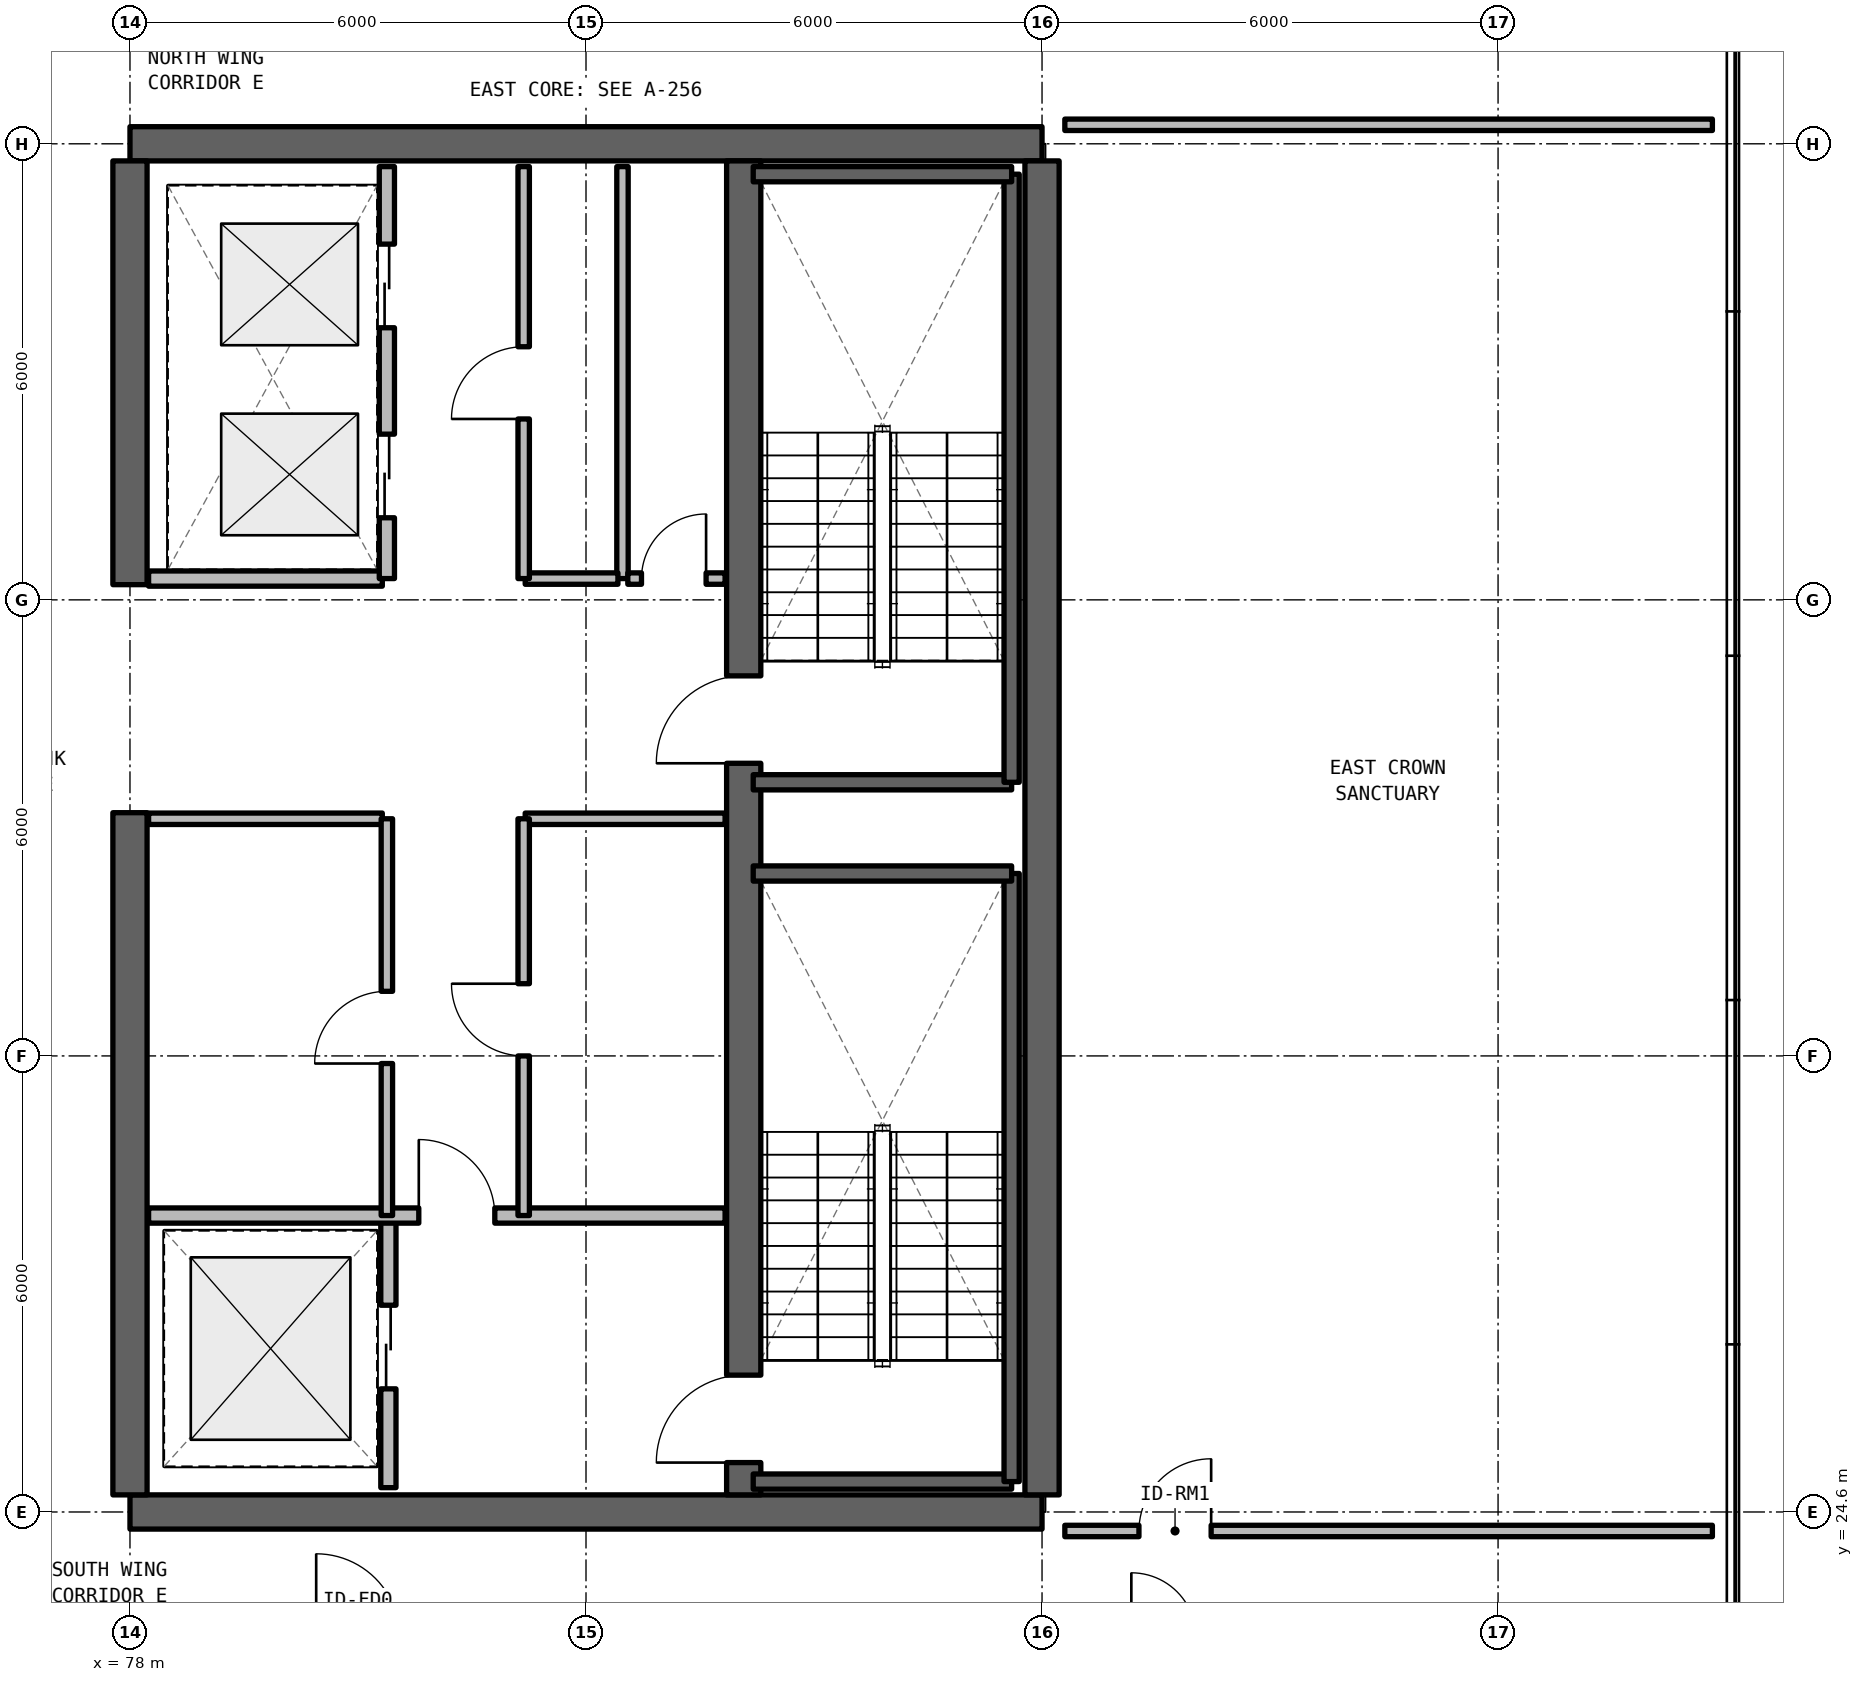
"""IFC4 building model, lengths in metres.
Left out: names, types, materials, properties, quantities, classifications, styles, units other than length and angle.
Written with IfcOpenShell. Run it as: python <this file> out.ifc"""

import sys

from ifc_helpers import new_model, si_unit, direction, frame, frame_2d, origin, place, context, subcontext, project, spatial, rectangle, extrude, element, fill, save


model = new_model("IFC4")
c1 = context("Model", 3, precision=1e-05, world=origin(), true_north=direction((0.0, 1.0)))
c2 = subcontext(c1, "Body", "Model", "MODEL_VIEW")
j1 = project(units=[si_unit("LENGTHUNIT", "METRE"), si_unit("PLANEANGLEUNIT", "RADIAN")], contexts=[c1])
p1 = place(None, origin())
s1 = spatial("IfcSite", under=j1, at=p1, CompositionType="ELEMENT")
p2 = place(p1, origin())
s2 = spatial("IfcBuilding", under=s1, at=p2, CompositionType="ELEMENT")
p3 = place(p2, frame((0.0, 0.0, 264.33)))
s3 = spatial("IfcBuildingStorey", under=s2, at=p3, CompositionType="ELEMENT", Elevation=264.33)
for number, where, z_axis, x_axis in (
    (1, (78.0, 24.6, 0.0), (0.0, 0.0, 1.0), (1.0, 0.0, 0.0)),
    (2, (90.0, 42.6, 0.0), (0.0, 0.0, 1.0), (-1.0, 0.0, 0.0)),
):
    element("IfcWall", number, at=place(p3, frame(where, z_axis=z_axis, x_axis=x_axis)), inside=s3, PredefinedType="SHEAR", context=c2, shape_type="SweptSolid", body=[
        extrude(rectangle(XDim=12.0, YDim=0.45, at=frame_2d((6.0, 0.0))), origin(), (0.0, 0.0, 1.0), 3.63),
    ])
p4 = place(p3, frame((90.0, 24.825, 0.0), z_axis=(0.0, 0.0, 1.0), x_axis=(0.0, 1.0, 0.0)))
e3 = element("IfcWall", 3, at=p4, inside=s3, PredefinedType="SHEAR", context=c2, shape_type="SweptSolid", body=[
    extrude(rectangle(XDim=17.55, YDim=0.45, at=frame_2d((8.775, 0.0))), origin(), (0.0, 0.0, 1.0), 3.63),
])
p5 = place(p3, frame((78.0, 24.825, 0.0), z_axis=(0.0, 0.0, 1.0), x_axis=(0.0, 1.0, 0.0)))
e4 = element("IfcWall", 4, at=p5, inside=s3, PredefinedType="SHEAR", context=c2, shape_type="SweptSolid", body=[
    extrude(rectangle(XDim=8.975, YDim=0.45, at=frame_2d((4.488, 0.0))), origin(), (0.0, 0.0, 1.0), 3.63),
])
p6 = place(p3, frame((78.0, 36.8, 0.0), z_axis=(0.0, 0.0, 1.0), x_axis=(0.0, 1.0, 0.0)))
e5 = element("IfcWall", 5, at=p6, inside=s3, PredefinedType="SHEAR", context=c2, shape_type="SweptSolid", body=[
    extrude(rectangle(XDim=5.575, YDim=0.45, at=frame_2d((2.788, 0.0))), origin(), (0.0, 0.0, 1.0), 3.63),
])
p7 = place(p3, frame((86.075, 24.825, 0.0), z_axis=(0.0, 0.0, 1.0), x_axis=(0.0, 1.0, 0.0)))
e6 = element("IfcWall", 6, at=p7, inside=s3, PredefinedType="SHEAR", context=c2, shape_type="SweptSolid", body=[
    extrude(rectangle(XDim=17.55, YDim=0.45, at=frame_2d((8.775, 0.0))), origin(), (0.0, 0.0, 1.0), 3.63),
])
p8 = place(p7, frame((0.425, 0.0, 0.0)))
e7 = element("IfcOpeningElement", 7, at=p8, cuts=e6, PredefinedType="OPENING", context=c2, shape_type="SweptSolid", body=[
    extrude(rectangle(XDim=1.15, YDim=2.15, at=frame_2d((0.575, 1.075))), frame((0.0, 0.235, 0.0), z_axis=(0.0, -1.0, 0.0), x_axis=(1.0, 0.0, 0.0)), (0.0, 0.0, 1.0), 0.47),
])
p9 = place(p7, frame((9.625, 0.0, 0.0)))
e8 = element("IfcOpeningElement", 8, at=p9, cuts=e6, PredefinedType="OPENING", context=c2, shape_type="SweptSolid", body=[
    extrude(rectangle(XDim=1.15, YDim=2.15, at=frame_2d((0.575, 1.075))), frame((0.0, 0.235, 0.0), z_axis=(0.0, -1.0, 0.0), x_axis=(1.0, 0.0, 0.0)), (0.0, 0.0, 1.0), 0.47),
])
p10 = place(p3, frame((81.4, 24.92, 0.0), z_axis=(0.0, 0.0, 1.0), x_axis=(0.0, 1.0, 0.0)))
e9 = element("IfcWall", 9, at=p10, inside=s3, PredefinedType="SOLIDWALL", context=c2, shape_type="SweptSolid", body=[
    extrude(rectangle(XDim=3.58, YDim=0.2, at=frame_2d((1.79, 0.0))), origin(), (0.0, 0.0, 1.0), 2.63),
])
p11 = place(p10, frame((1.3, 0.0, 0.0)))
e10 = element("IfcOpeningElement", 10, at=p11, cuts=e9, PredefinedType="OPENING", context=c2, shape_type="SweptSolid", body=[
    extrude(rectangle(XDim=1.1, YDim=2.2, at=frame_2d((0.55, 1.1))), frame((0.0, 0.11, 0.0), z_axis=(0.0, -1.0, 0.0), x_axis=(1.0, 0.0, 0.0)), (0.0, 0.0, 1.0), 0.22),
])
p12 = place(p3, frame((78.245, 28.5, 0.0), z_axis=(0.0, 0.0, 1.0), x_axis=(1.0, 0.0, 0.0)))
e11 = element("IfcWall", 11, at=p12, inside=s3, PredefinedType="SOLIDWALL", context=c2, shape_type="SweptSolid", body=[
    extrude(rectangle(XDim=7.585, YDim=0.2, at=frame_2d((3.792, 0.0))), origin(), (0.0, 0.0, 1.0), 2.63),
])
p13 = place(p12, frame((3.555, 0.0, 0.0)))
e12 = element("IfcOpeningElement", 12, at=p13, cuts=e11, PredefinedType="OPENING", context=c2, shape_type="SweptSolid", body=[
    extrude(rectangle(XDim=1.0, YDim=2.15, at=frame_2d((0.5, 1.075))), frame((0.0, 0.11, 0.0), z_axis=(0.0, -1.0, 0.0), x_axis=(1.0, 0.0, 0.0)), (0.0, 0.0, 1.0), 0.22),
])
p14 = place(p3, frame((83.2, 33.72, 0.0), z_axis=(0.0, 0.0, 1.0), x_axis=(1.0, 0.0, 0.0)))
e13 = element("IfcWall", 13, at=p14, inside=s3, PredefinedType="SOLIDWALL", context=c2, shape_type="SweptSolid", body=[
    extrude(rectangle(XDim=2.63, YDim=0.15, at=frame_2d((1.315, 0.0))), origin(), (0.0, 0.0, 1.0), 2.63),
])
p15 = place(p3, frame((83.18, 28.5, 0.0), z_axis=(0.0, 0.0, 1.0), x_axis=(0.0, 1.0, 0.0)))
e14 = element("IfcWall", 14, at=p15, inside=s3, PredefinedType="SOLIDWALL", context=c2, shape_type="SweptSolid", body=[
    extrude(rectangle(XDim=5.22, YDim=0.15, at=frame_2d((2.61, 0.0))), origin(), (0.0, 0.0, 1.0), 2.63),
])
p16 = place(p15, frame((2.1, 0.0, 0.0)))
e15 = element("IfcOpeningElement", 15, at=p16, cuts=e14, PredefinedType="OPENING", context=c2, shape_type="SweptSolid", body=[
    extrude(rectangle(XDim=0.95, YDim=2.15, at=frame_2d((0.475, 1.075))), frame((0.0, 0.085, 0.0), z_axis=(0.0, -1.0, 0.0), x_axis=(1.0, 0.0, 0.0)), (0.0, 0.0, 1.0), 0.17),
])
p17 = place(p3, frame((78.245, 33.72, 0.0), z_axis=(0.0, 0.0, 1.0), x_axis=(1.0, 0.0, 0.0)))
e16 = element("IfcWall", 16, at=p17, inside=s3, PredefinedType="SOLIDWALL", context=c2, shape_type="SweptSolid", body=[
    extrude(rectangle(XDim=3.075, YDim=0.15, at=frame_2d((1.538, 0.0))), origin(), (0.0, 0.0, 1.0), 2.63),
])
p18 = place(p3, frame((81.38, 28.5, 0.0), z_axis=(0.0, 0.0, 1.0), x_axis=(0.0, 1.0, 0.0)))
e17 = element("IfcWall", 17, at=p18, inside=s3, PredefinedType="SOLIDWALL", context=c2, shape_type="SweptSolid", body=[
    extrude(rectangle(XDim=5.22, YDim=0.15, at=frame_2d((2.61, 0.0))), origin(), (0.0, 0.0, 1.0), 2.63),
])
p19 = place(p18, frame((2.0, 0.0, 0.0)))
e18 = element("IfcOpeningElement", 18, at=p19, cuts=e17, PredefinedType="OPENING", context=c2, shape_type="SweptSolid", body=[
    extrude(rectangle(XDim=0.95, YDim=2.15, at=frame_2d((0.475, 1.075))), frame((0.0, 0.085, 0.0), z_axis=(0.0, -1.0, 0.0), x_axis=(1.0, 0.0, 0.0)), (0.0, 0.0, 1.0), 0.17),
])
p20 = place(p3, frame((84.48, 36.88, 0.0), z_axis=(0.0, 0.0, 1.0), x_axis=(0.0, 1.0, 0.0)))
e19 = element("IfcWall", 19, at=p20, inside=s3, PredefinedType="SOLIDWALL", context=c2, shape_type="SweptSolid", body=[
    extrude(rectangle(XDim=5.42, YDim=0.15, at=frame_2d((2.71, 0.0))), origin(), (0.0, 0.0, 1.0), 2.63),
])
p21 = place(p3, frame((84.55, 36.88, 0.0), z_axis=(0.0, 0.0, 1.0), x_axis=(1.0, 0.0, 0.0)))
e20 = element("IfcWall", 20, at=p21, inside=s3, PredefinedType="SOLIDWALL", context=c2, shape_type="SweptSolid", body=[
    extrude(rectangle(XDim=1.28, YDim=0.15, at=frame_2d((0.64, 0.0))), origin(), (0.0, 0.0, 1.0), 2.63),
])
p22 = place(p21, frame((0.18, 0.0, 0.0)))
e21 = element("IfcOpeningElement", 21, at=p22, cuts=e20, PredefinedType="OPENING", context=c2, shape_type="SweptSolid", body=[
    extrude(rectangle(XDim=0.85, YDim=2.1, at=frame_2d((0.425, 1.05))), frame((0.0, 0.085, 0.0), z_axis=(0.0, -1.0, 0.0), x_axis=(1.0, 0.0, 0.0)), (0.0, 0.0, 1.0), 0.17),
])
p23 = place(p3, frame((83.2, 36.88, 0.0), z_axis=(0.0, 0.0, 1.0), x_axis=(1.0, 0.0, 0.0)))
e22 = element("IfcWall", 22, at=p23, inside=s3, PredefinedType="SOLIDWALL", context=c2, shape_type="SweptSolid", body=[
    extrude(rectangle(XDim=1.22, YDim=0.15, at=frame_2d((0.61, 0.0))), origin(), (0.0, 0.0, 1.0), 2.63),
])
p24 = place(p3, frame((83.18, 36.88, 0.0), z_axis=(0.0, 0.0, 1.0), x_axis=(0.0, 1.0, 0.0)))
e23 = element("IfcWall", 23, at=p24, inside=s3, PredefinedType="SOLIDWALL", context=c2, shape_type="SweptSolid", body=[
    extrude(rectangle(XDim=5.42, YDim=0.15, at=frame_2d((2.71, 0.0))), origin(), (0.0, 0.0, 1.0), 2.63),
])
p25 = place(p24, frame((2.1, 0.0, 0.0)))
e24 = element("IfcOpeningElement", 24, at=p25, cuts=e23, PredefinedType="OPENING", context=c2, shape_type="SweptSolid", body=[
    extrude(rectangle(XDim=0.95, YDim=2.15, at=frame_2d((0.475, 1.075))), frame((0.0, 0.085, 0.0), z_axis=(0.0, -1.0, 0.0), x_axis=(1.0, 0.0, 0.0)), (0.0, 0.0, 1.0), 0.17),
])
p26 = place(p3, frame((78.245, 36.88, 0.0), z_axis=(0.0, 0.0, 1.0), x_axis=(1.0, 0.0, 0.0)))
e25 = element("IfcWall", 25, at=p26, inside=s3, PredefinedType="SOLIDWALL", context=c2, shape_type="SweptSolid", body=[
    extrude(rectangle(XDim=3.075, YDim=0.2, at=frame_2d((1.538, 0.0))), origin(), (0.0, 0.0, 1.0), 2.63),
])
p27 = place(p3, frame((81.38, 36.88, 0.0), z_axis=(0.0, 0.0, 1.0), x_axis=(0.0, 1.0, 0.0)))
e26 = element("IfcWall", 26, at=p27, inside=s3, PredefinedType="SOLIDWALL", context=c2, shape_type="SweptSolid", body=[
    extrude(rectangle(XDim=5.42, YDim=0.2, at=frame_2d((2.71, 0.0))), origin(), (0.0, 0.0, 1.0), 2.63),
])
p28 = place(p27, frame((0.8, 0.0, 0.0)))
e27 = element("IfcOpeningElement", 27, at=p28, cuts=e26, PredefinedType="OPENING", context=c2, shape_type="SweptSolid", body=[
    extrude(rectangle(XDim=1.1, YDim=2.2, at=frame_2d((0.55, 1.1))), frame((0.0, 0.11, 0.0), z_axis=(0.0, -1.0, 0.0), x_axis=(1.0, 0.0, 0.0)), (0.0, 0.0, 1.0), 0.22),
])
p29 = place(p27, frame((3.3, 0.0, 0.0)))
e28 = element("IfcOpeningElement", 28, at=p29, cuts=e26, PredefinedType="OPENING", context=c2, shape_type="SweptSolid", body=[
    extrude(rectangle(XDim=1.1, YDim=2.2, at=frame_2d((0.55, 1.1))), frame((0.0, 0.11, 0.0), z_axis=(0.0, -1.0, 0.0), x_axis=(1.0, 0.0, 0.0)), (0.0, 0.0, 1.0), 0.22),
])
p30 = place(p3, frame((90.3, 24.35, 0.0), z_axis=(0.0, 0.0, 1.0), x_axis=(1.0, 0.0, 0.0)))
e29 = element("IfcWall", 29, at=p30, inside=s3, PredefinedType="SOLIDWALL", context=c2, shape_type="SweptSolid", body=[
    extrude(rectangle(XDim=8.52, YDim=0.15, at=frame_2d((4.26, 0.0))), origin(), (0.0, 0.0, 1.0), 2.63),
])
p31 = place(p30, frame((0.975, 0.0, 0.0)))
e30 = element("IfcOpeningElement", 30, at=p31, cuts=e29, PredefinedType="OPENING", context=c2, shape_type="SweptSolid", body=[
    extrude(rectangle(XDim=0.95, YDim=2.15, at=frame_2d((0.475, 1.075))), frame((0.0, 0.085, 0.0), z_axis=(0.0, -1.0, 0.0), x_axis=(1.0, 0.0, 0.0)), (0.0, 0.0, 1.0), 0.17),
])
p32 = place(p3, frame((90.3, 42.85, 0.0), z_axis=(0.0, 0.0, 1.0), x_axis=(1.0, 0.0, 0.0)))
e31 = element("IfcWall", 31, at=p32, inside=s3, PredefinedType="SOLIDWALL", context=c2, shape_type="SweptSolid", body=[
    extrude(rectangle(XDim=8.52, YDim=0.15, at=frame_2d((4.26, 0.0))), origin(), (0.0, 0.0, 1.0), 2.63),
])
p33 = place(p3, frame((86.2, 25.0, 0.0), z_axis=(0.0, 0.0, 1.0), x_axis=(1.0, 0.0, 0.0)))
e32 = element("IfcWall", 32, at=p33, inside=s3, PredefinedType="SOLIDWALL", context=c2, shape_type="SweptSolid", body=[
    extrude(rectangle(XDim=3.4, YDim=0.2, at=frame_2d((1.7, 0.0))), origin(), (0.0, 0.0, 1.0), 3.63),
])
p34 = place(p3, frame((89.6, 25.0, 0.0), z_axis=(0.0, 0.0, 1.0), x_axis=(0.0, 1.0, 0.0)))
e33 = element("IfcWall", 33, at=p34, inside=s3, PredefinedType="SOLIDWALL", context=c2, shape_type="SweptSolid", body=[
    extrude(rectangle(XDim=8.0, YDim=0.2, at=frame_2d((4.0, 0.0))), origin(), (0.0, 0.0, 1.0), 3.63),
])
for number, where, z_axis, x_axis in (
    (34, (89.6, 33.0, 0.0), (0.0, 0.0, 1.0), (-1.0, 0.0, 0.0)),
    (35, (86.2, 34.2, 0.0), (0.0, 0.0, 1.0), (1.0, 0.0, 0.0)),
):
    element("IfcWall", number, at=place(p3, frame(where, z_axis=z_axis, x_axis=x_axis)), inside=s3, PredefinedType="SOLIDWALL", context=c2, shape_type="SweptSolid", body=[
        extrude(rectangle(XDim=3.4, YDim=0.2, at=frame_2d((1.7, 0.0))), origin(), (0.0, 0.0, 1.0), 3.63),
    ])
p35 = place(p3, frame((89.6, 34.2, 0.0), z_axis=(0.0, 0.0, 1.0), x_axis=(0.0, 1.0, 0.0)))
e36 = element("IfcWall", 36, at=p35, inside=s3, PredefinedType="SOLIDWALL", context=c2, shape_type="SweptSolid", body=[
    extrude(rectangle(XDim=8.0, YDim=0.2, at=frame_2d((4.0, 0.0))), origin(), (0.0, 0.0, 1.0), 3.63),
])
p36 = place(p3, frame((89.6, 42.2, 0.0), z_axis=(0.0, 0.0, 1.0), x_axis=(-1.0, 0.0, 0.0)))
e37 = element("IfcWall", 37, at=p36, inside=s3, PredefinedType="SOLIDWALL", context=c2, shape_type="SweptSolid", body=[
    extrude(rectangle(XDim=3.4, YDim=0.2, at=frame_2d((1.7, 0.0))), origin(), (0.0, 0.0, 1.0), 3.63),
])
p37 = place(p11, origin())
e38 = element("IfcDoor", 38, at=p37, inside=s3, OperationType="SLIDING_TO_LEFT", PredefinedType="DOOR", context=c2, shape_type="SweptSolid", body=[
    extrude(rectangle(XDim=1.1, YDim=2.2, at=frame_2d((0.55, 1.1))), frame((0.0, 0.025, 0.0), z_axis=(0.0, -1.0, 0.0), x_axis=(1.0, 0.0, 0.0)), (0.0, 0.0, 1.0), 0.05),
])
fill(e10, e38)
p38 = place(p13, origin())
e39 = element("IfcDoor", 39, at=p38, inside=s3, OperationType="SINGLE_SWING_LEFT", PredefinedType="DOOR", context=c2, shape_type="SweptSolid", body=[
    extrude(rectangle(XDim=1.0, YDim=2.15, at=frame_2d((0.5, 1.075))), frame((0.0, 0.025, 0.0), z_axis=(0.0, -1.0, 0.0), x_axis=(1.0, 0.0, 0.0)), (0.0, 0.0, 1.0), 0.05),
])
fill(e12, e39)
p39 = place(p16, origin())
e40 = element("IfcDoor", 40, at=p39, inside=s3, OperationType="SINGLE_SWING_RIGHT", PredefinedType="DOOR", context=c2, shape_type="SweptSolid", body=[
    extrude(rectangle(XDim=0.95, YDim=2.15, at=frame_2d((0.475, 1.075))), frame((0.0, 0.025, 0.0), z_axis=(0.0, -1.0, 0.0), x_axis=(1.0, 0.0, 0.0)), (0.0, 0.0, 1.0), 0.05),
])
fill(e15, e40)
p40 = place(p19, origin())
e41 = element("IfcDoor", 41, at=p40, inside=s3, OperationType="SINGLE_SWING_LEFT", PredefinedType="DOOR", context=c2, shape_type="SweptSolid", body=[
    extrude(rectangle(XDim=0.95, YDim=2.15, at=frame_2d((0.475, 1.075))), frame((0.0, 0.025, 0.0), z_axis=(0.0, -1.0, 0.0), x_axis=(1.0, 0.0, 0.0)), (0.0, 0.0, 1.0), 0.05),
])
fill(e18, e41)
p41 = place(p22, origin())
e42 = element("IfcDoor", 42, at=p41, inside=s3, OperationType="SINGLE_SWING_RIGHT", PredefinedType="DOOR", context=c2, shape_type="SweptSolid", body=[
    extrude(rectangle(XDim=0.85, YDim=2.1, at=frame_2d((0.425, 1.05))), frame((0.0, 0.025, 0.0), z_axis=(0.0, -1.0, 0.0), x_axis=(1.0, 0.0, 0.0)), (0.0, 0.0, 1.0), 0.05),
])
fill(e21, e42)
p42 = place(p25, origin())
e43 = element("IfcDoor", 43, at=p42, inside=s3, OperationType="SINGLE_SWING_LEFT", PredefinedType="DOOR", context=c2, shape_type="SweptSolid", body=[
    extrude(rectangle(XDim=0.95, YDim=2.15, at=frame_2d((0.475, 1.075))), frame((0.0, 0.025, 0.0), z_axis=(0.0, -1.0, 0.0), x_axis=(1.0, 0.0, 0.0)), (0.0, 0.0, 1.0), 0.05),
])
fill(e24, e43)
p43 = place(p28, origin())
e44 = element("IfcDoor", 44, at=p43, inside=s3, OperationType="SLIDING_TO_LEFT", PredefinedType="DOOR", context=c2, shape_type="SweptSolid", body=[
    extrude(rectangle(XDim=1.1, YDim=2.2, at=frame_2d((0.55, 1.1))), frame((0.0, 0.025, 0.0), z_axis=(0.0, -1.0, 0.0), x_axis=(1.0, 0.0, 0.0)), (0.0, 0.0, 1.0), 0.05),
])
fill(e27, e44)
p44 = place(p29, origin())
e45 = element("IfcDoor", 45, at=p44, inside=s3, OperationType="SLIDING_TO_RIGHT", PredefinedType="DOOR", context=c2, shape_type="SweptSolid", body=[
    extrude(rectangle(XDim=1.1, YDim=2.2, at=frame_2d((0.55, 1.1))), frame((0.0, 0.025, 0.0), z_axis=(0.0, -1.0, 0.0), x_axis=(1.0, 0.0, 0.0)), (0.0, 0.0, 1.0), 0.05),
])
fill(e28, e45)
p45 = place(p31, origin())
e46 = element("IfcDoor", 46, at=p45, inside=s3, OperationType="SINGLE_SWING_RIGHT", PredefinedType="DOOR", context=c2, shape_type="SweptSolid", body=[
    extrude(rectangle(XDim=0.95, YDim=2.15, at=frame_2d((0.475, 1.075))), frame((0.0, 0.025, 0.0), z_axis=(0.0, -1.0, 0.0), x_axis=(1.0, 0.0, 0.0)), (0.0, 0.0, 1.0), 0.05),
])
fill(e30, e46)
p46 = place(p8, origin())
e47 = element("IfcDoor", 47, at=p46, inside=s3, OperationType="SINGLE_SWING_RIGHT", PredefinedType="DOOR", context=c2, shape_type="SweptSolid", body=[
    extrude(rectangle(XDim=1.15, YDim=2.15, at=frame_2d((0.575, 1.075))), frame((0.0, 0.025, 0.0), z_axis=(0.0, -1.0, 0.0), x_axis=(1.0, 0.0, 0.0)), (0.0, 0.0, 1.0), 0.05),
])
fill(e7, e47)
p47 = place(p9, origin())
e48 = element("IfcDoor", 48, at=p47, inside=s3, OperationType="SINGLE_SWING_LEFT", PredefinedType="DOOR", context=c2, shape_type="SweptSolid", body=[
    extrude(rectangle(XDim=1.15, YDim=2.15, at=frame_2d((0.575, 1.075))), frame((0.0, 0.025, 0.0), z_axis=(0.0, -1.0, 0.0), x_axis=(1.0, 0.0, 0.0)), (0.0, 0.0, 1.0), 0.05),
])
fill(e8, e48)
save(model, sys.argv[1])
